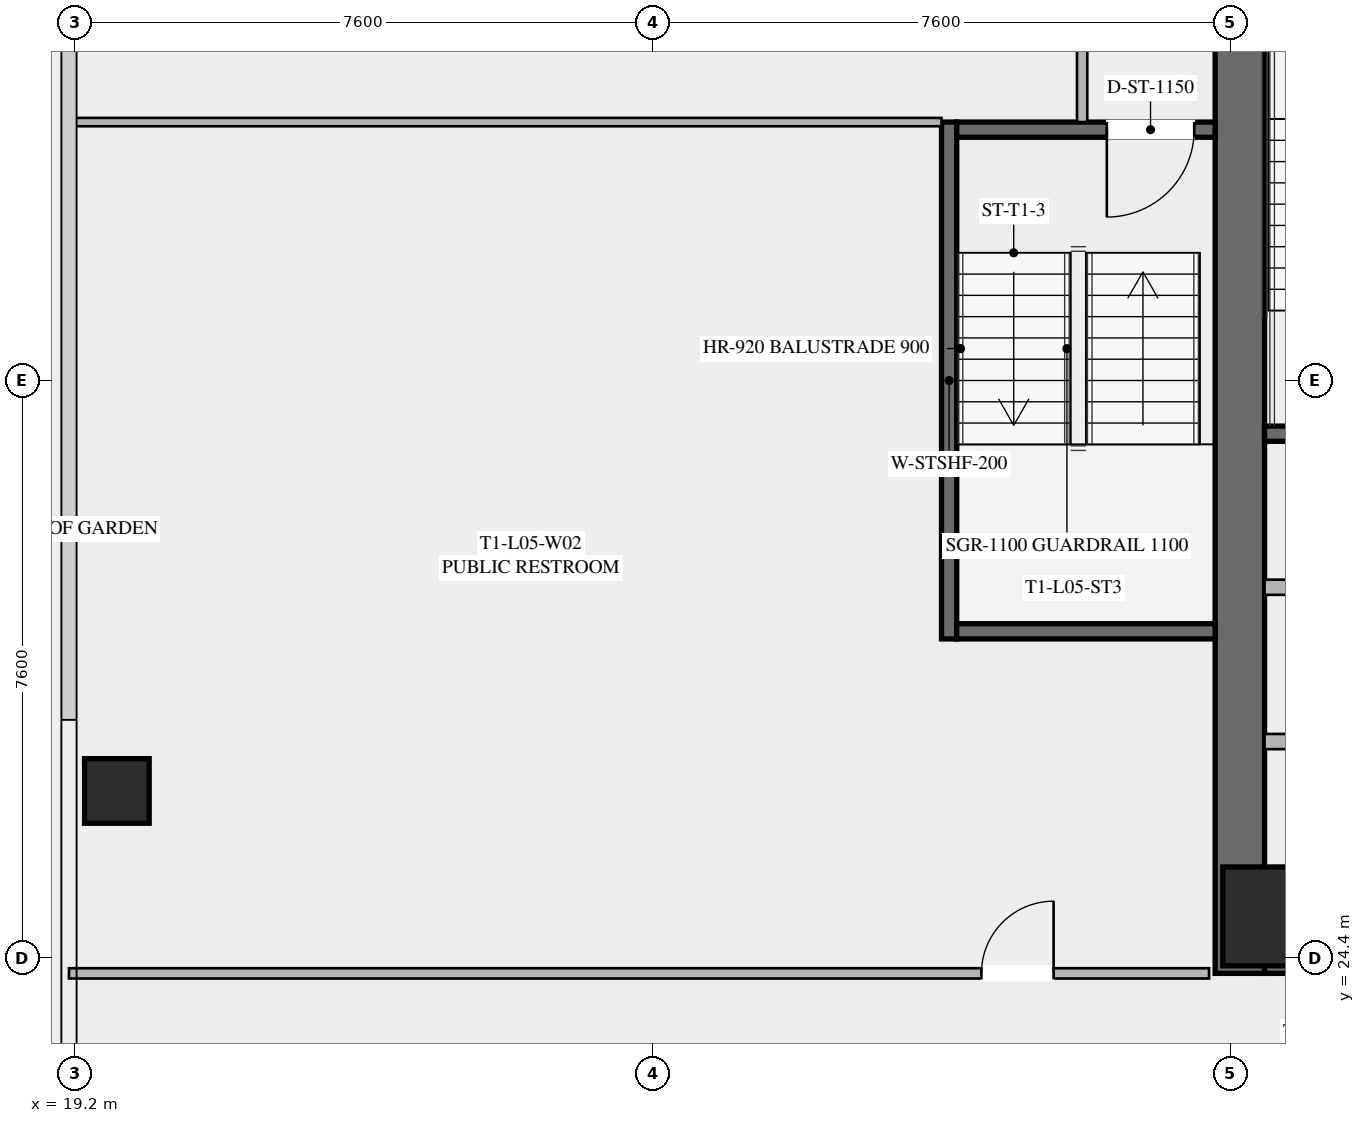
"""IFC4 building model, lengths in metres.
Left out: names, types, materials, properties, quantities, classifications, styles, units other than length and angle.
Written with IfcOpenShell. Run it as: python <this file> out.ifc"""

import sys

from ifc_helpers import new_model, si_unit, direction, frame, frame_2d, origin, origin_2d, place, context, subcontext, project, spatial, rectangle, hollow_rectangle, extrude, element, fill, save


model = new_model("IFC4")
c1 = context("Model", 3, precision=1e-05, world=origin(), true_north=direction((0.0, 1.0)))
c2 = subcontext(c1, "Body", "Model", "MODEL_VIEW")
j1 = project(units=[si_unit("LENGTHUNIT", "METRE"), si_unit("PLANEANGLEUNIT", "RADIAN")], contexts=[c1])
p1 = place(None, origin())
s1 = spatial("IfcSite", under=j1, at=p1, CompositionType="ELEMENT")
p2 = place(p1, origin())
s2 = spatial("IfcBuilding", under=s1, at=p2, CompositionType="ELEMENT")
p3 = place(p2, frame((0.0, 0.0, 24.6)))
s3 = spatial("IfcBuildingStorey", under=s2, at=p3, CompositionType="ELEMENT", Elevation=24.6)
p4 = place(p3, frame((34.525, 24.2, 0.0), z_axis=(0.0, 0.0, 1.0), x_axis=(0.0, 1.0, 0.0)))
e1 = element("IfcWall", 1, at=p4, inside=s3, PredefinedType="SHEAR", context=c2, shape_type="SweptSolid", body=[
    extrude(rectangle(XDim=15.6, YDim=0.65, at=frame_2d((7.8, 0.0))), origin(), (0.0, 0.0, 1.0), 3.55),
])
p5 = place(p3, frame((49.15, 24.525, 0.0), z_axis=(0.0, 0.0, 1.0), x_axis=(-1.0, 0.0, 0.0)))
e2 = element("IfcWall", 2, at=p5, inside=s3, PredefinedType="SHEAR", context=c2, shape_type="SweptSolid", body=[
    extrude(rectangle(XDim=14.3, YDim=0.65, at=frame_2d((7.15, 0.0))), origin(), (0.0, 0.0, 1.0), 3.55),
])
p6 = place(p5, frame((8.85, 0.0, 0.0)))
e3 = element("IfcOpeningElement", 3, at=p6, cuts=e2, PredefinedType="OPENING", context=c2, shape_type="SweptSolid", body=[
    extrude(rectangle(XDim=1.25, YDim=2.25, at=frame_2d((0.625, 1.125))), frame((0.0, 0.335, 0.0), z_axis=(0.0, -1.0, 0.0), x_axis=(1.0, 0.0, 0.0)), (0.0, 0.0, 1.0), 0.67),
])
p7 = place(p5, frame((3.8, 0.0, 0.0)))
e4 = element("IfcOpeningElement", 4, at=p7, cuts=e2, PredefinedType="OPENING", context=c2, shape_type="SweptSolid", body=[
    extrude(rectangle(XDim=1.25, YDim=2.25, at=frame_2d((0.625, 1.125))), frame((0.0, 0.335, 0.0), z_axis=(0.0, -1.0, 0.0), x_axis=(1.0, 0.0, 0.0)), (0.0, 0.0, 1.0), 0.67),
])
p8 = place(p3, frame((34.95, 24.95, 0.0), z_axis=(0.0, 0.0, 1.0), x_axis=(1.0, 0.0, 0.0)))
e5 = element("IfcColumn", 5, at=p8, inside=s3, PredefinedType="COLUMN", context=c2, shape_type="SweptSolid", body=[
    extrude(hollow_rectangle(XDim=1.3, YDim=1.3, WallThickness=0.05, at=origin_2d()), origin(), (0.0, 0.0, 1.0), 3.35),
])
p9 = place(p3, frame((19.75, 26.6, 0.0), z_axis=(0.0, 0.0, 1.0), x_axis=(1.0, 0.0, 0.0)))
e6 = element("IfcColumn", 6, at=p9, inside=s3, PredefinedType="COLUMN", context=c2, shape_type="SweptSolid", body=[
    extrude(hollow_rectangle(XDim=0.85, YDim=0.85, WallThickness=0.035, at=origin_2d()), origin(), (0.0, 0.0, 1.0), 3.35),
])
p10 = place(p3, frame((34.85, 31.3, 0.0), z_axis=(0.0, 0.0, 1.0), x_axis=(1.0, 0.0, 0.0)))
e7 = element("IfcWall", 7, at=p10, inside=s3, PredefinedType="SHEAR", context=c2, shape_type="SweptSolid", body=[
    extrude(rectangle(XDim=3.45, YDim=0.2, at=frame_2d((1.725, 0.0))), origin(), (0.0, 0.0, 1.0), 3.35),
])
for number, where, z_axis, x_axis in (
    (8, (34.85, 27.25, 0.0), (0.0, 0.0, 1.0), (1.0, 0.0, 0.0)),
    (9, (34.85, 29.28, 0.0), (0.0, 0.0, 1.0), (1.0, 0.0, 0.0)),
):
    element("IfcWall", number, at=place(p3, frame(where, z_axis=z_axis, x_axis=x_axis)), inside=s3, PredefinedType="SOLIDWALL", context=c2, shape_type="SweptSolid", body=[
        extrude(rectangle(XDim=3.1, YDim=0.2, at=frame_2d((1.55, 0.0))), origin(), (0.0, 0.0, 1.0), 3.35),
    ])
p11 = place(p3, frame((30.7, 28.6, 0.0), z_axis=(0.0, 0.0, 1.0), x_axis=(0.0, 1.0, 0.0)))
e10 = element("IfcWall", 10, at=p11, inside=s3, PredefinedType="SHEAR", context=c2, shape_type="SweptSolid", body=[
    extrude(rectangle(XDim=6.8, YDim=0.2, at=frame_2d((3.4, 0.0))), origin(), (0.0, 0.0, 1.0), 3.35),
])
p12 = place(p3, frame((34.2, 35.3, 0.0), z_axis=(0.0, 0.0, 1.0), x_axis=(-1.0, 0.0, 0.0)))
e11 = element("IfcWall", 11, at=p12, inside=s3, PredefinedType="SHEAR", context=c2, shape_type="SweptSolid", body=[
    extrude(rectangle(XDim=3.4, YDim=0.2, at=frame_2d((1.7, 0.0))), origin(), (0.0, 0.0, 1.0), 3.35),
])
p13 = place(p12, frame((0.275, 0.0, 0.0)))
e12 = element("IfcOpeningElement", 12, at=p13, cuts=e11, PredefinedType="OPENING", context=c2, shape_type="SweptSolid", body=[
    extrude(rectangle(XDim=1.15, YDim=2.2, at=frame_2d((0.575, 1.1))), frame((0.0, 0.11, 0.0), z_axis=(0.0, -1.0, 0.0), x_axis=(1.0, 0.0, 0.0)), (0.0, 0.0, 1.0), 0.22),
])
p14 = place(p3, frame((30.8, 28.7, 0.0), z_axis=(0.0, 0.0, 1.0), x_axis=(1.0, 0.0, 0.0)))
e13 = element("IfcWall", 13, at=p14, inside=s3, PredefinedType="SHEAR", context=c2, shape_type="SweptSolid", body=[
    extrude(rectangle(XDim=3.4, YDim=0.2, at=frame_2d((1.7, 0.0))), origin(), (0.0, 0.0, 1.0), 3.35),
])
p15 = place(p3, frame((32.45, 35.4, 0.0), z_axis=(0.0, 0.0, 1.0), x_axis=(0.0, 1.0, 0.0)))
e14 = element("IfcWall", 14, at=p15, inside=s3, PredefinedType="PARTITIONING", context=c2, shape_type="SweptSolid", body=[
    extrude(rectangle(XDim=4.4, YDim=0.135, at=frame_2d((2.2, 0.0))), origin(), (0.0, 0.0, 1.0), 2.703),
])
p16 = place(p3, frame((19.12, 24.2, 0.0), z_axis=(0.0, 0.0, 1.0), x_axis=(1.0, 0.0, 0.0)))
e15 = element("IfcWall", 15, at=p16, inside=s3, PredefinedType="PARTITIONING", context=c2, shape_type="SweptSolid", body=[
    extrude(rectangle(XDim=15.0, YDim=0.135, at=frame_2d((7.5, 0.0))), origin(), (0.0, 0.0, 1.0), 2.703),
])
p17 = place(p16, frame((12.005, 0.0, 0.0)))
e16 = element("IfcOpeningElement", 16, at=p17, cuts=e15, PredefinedType="OPENING", context=c2, shape_type="SweptSolid", body=[
    extrude(rectangle(XDim=0.95, YDim=2.05, at=frame_2d((0.475, 1.025))), frame((0.0, 0.077, 0.0), z_axis=(0.0, -1.0, 0.0), x_axis=(1.0, 0.0, 0.0)), (0.0, 0.0, 1.0), 0.155),
])
p18 = place(p3, frame((30.6, 35.4, 0.0), z_axis=(0.0, 0.0, 1.0), x_axis=(-1.0, 0.0, 0.0)))
e17 = element("IfcWall", 17, at=p18, inside=s3, PredefinedType="PARTITIONING", context=c2, shape_type="SweptSolid", body=[
    extrude(rectangle(XDim=11.48, YDim=0.11, at=frame_2d((5.74, 0.0))), origin(), (0.0, 0.0, 1.0), 2.703),
])
p19 = place(p13, origin())
e18 = element("IfcDoor", 18, at=p19, inside=s3, OperationType="SINGLE_SWING_RIGHT", PredefinedType="DOOR", context=c2, shape_type="SweptSolid", body=[
    extrude(rectangle(XDim=1.15, YDim=2.2, at=frame_2d((0.575, 1.1))), frame((0.0, 0.025, 0.0), z_axis=(0.0, -1.0, 0.0), x_axis=(1.0, 0.0, 0.0)), (0.0, 0.0, 1.0), 0.05),
])
fill(e12, e18)
p20 = place(p17, origin())
e19 = element("IfcDoor", 19, at=p20, inside=s3, OperationType="SINGLE_SWING_RIGHT", PredefinedType="DOOR", context=c2, shape_type="SweptSolid", body=[
    extrude(rectangle(XDim=0.95, YDim=2.05, at=frame_2d((0.475, 1.025))), frame((0.0, 0.025, 0.0), z_axis=(0.0, -1.0, 0.0), x_axis=(1.0, 0.0, 0.0)), (0.0, 0.0, 1.0), 0.05),
])
fill(e16, e19)
save(model, sys.argv[1])
